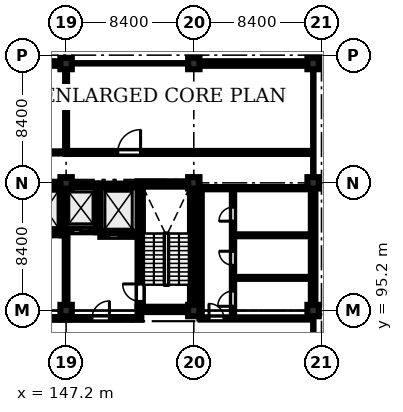
"""IFC4 building model, lengths in metres.
Left out: names, types, materials, properties, quantities, classifications, styles, units other than length and angle.
Written with IfcOpenShell. Run it as: python <this file> out.ifc"""

import sys

from ifc_helpers import new_model, si_unit, direction, frame, frame_2d, origin, origin_2d, place, context, subcontext, project, spatial, rectangle, extrude, element, fill, save


model = new_model("IFC4")
c1 = context("Model", 3, precision=1e-05, world=origin(), true_north=direction((0.0, 1.0)))
c2 = subcontext(c1, "Body", "Model", "MODEL_VIEW")
j1 = project(units=[si_unit("LENGTHUNIT", "METRE"), si_unit("PLANEANGLEUNIT", "RADIAN")], contexts=[c1])
p1 = place(None, origin())
s1 = spatial("IfcSite", under=j1, at=p1, CompositionType="ELEMENT")
p2 = place(p1, origin())
s2 = spatial("IfcBuilding", under=s1, at=p2, CompositionType="ELEMENT")
p3 = place(p2, frame((0.0, 0.0, 48.6)))
s3 = spatial("IfcBuildingStorey", under=s2, at=p3, CompositionType="ELEMENT", Elevation=48.6)
for number, where, z_axis, x_axis in (
    (1, (147.2, 95.2, 0.0), (0.0, 0.0, 1.0), (1.0, 0.0, 0.0)),
    (2, (147.2, 103.6, 0.0), (0.0, 0.0, 1.0), (1.0, 0.0, 0.0)),
    (3, (147.2, 111.45, 0.0), (0.0, 0.0, 1.0), (1.0, 0.0, 0.0)),
    (4, (155.6, 95.2, 0.0), (0.0, 0.0, 1.0), (1.0, 0.0, 0.0)),
    (5, (155.6, 103.6, 0.0), (0.0, 0.0, 1.0), (1.0, 0.0, 0.0)),
    (6, (155.6, 111.45, 0.0), (0.0, 0.0, 1.0), (1.0, 0.0, 0.0)),
    (7, (163.45, 95.2, 0.0), (0.0, 0.0, 1.0), (1.0, 0.0, 0.0)),
    (8, (163.45, 103.6, 0.0), (0.0, 0.0, 1.0), (1.0, 0.0, 0.0)),
    (9, (163.45, 111.45, 0.0), (0.0, 0.0, 1.0), (1.0, 0.0, 0.0)),
):
    element("IfcColumn", number, at=place(p3, frame(where, z_axis=z_axis, x_axis=x_axis)), inside=s3, PredefinedType="COLUMN", context=c2, shape_type="SweptSolid", body=[
        extrude(rectangle(XDim=0.75, YDim=0.75, at=origin_2d()), origin(), (0.0, 0.0, 1.0), 4.03),
    ])
for number, where, z_axis, x_axis in (
    (10, (151.9, 95.275, 0.0), (0.0, 0.0, 1.0), (1.0, 0.0, 0.0)),
    (11, (151.9, 103.525, 0.0), (0.0, 0.0, 1.0), (1.0, 0.0, 0.0)),
):
    element("IfcWall", number, at=place(p3, frame(where, z_axis=z_axis, x_axis=x_axis)), inside=s3, PredefinedType="SHEAR", context=c2, shape_type="SweptSolid", body=[
        extrude(rectangle(XDim=3.8, YDim=0.35, at=frame_2d((1.9, 0.0))), origin(), (0.0, 0.0, 1.0), 4.03),
    ])
p4 = place(p3, frame((152.075, 95.45, 0.0), z_axis=(0.0, 0.0, 1.0), x_axis=(0.0, 1.0, 0.0)))
e12 = element("IfcWall", 12, at=p4, inside=s3, PredefinedType="SHEAR", context=c2, shape_type="SweptSolid", body=[
    extrude(rectangle(XDim=7.9, YDim=0.35, at=frame_2d((3.95, 0.0))), origin(), (0.0, 0.0, 1.0), 4.03),
])
p5 = place(p4, frame((0.35, 0.0, 0.0)))
e13 = element("IfcOpeningElement", 13, at=p5, cuts=e12, PredefinedType="OPENING", context=c2, shape_type="SweptSolid", body=[
    extrude(rectangle(XDim=1.15, YDim=2.15, at=frame_2d((0.575, 1.075))), frame((0.0, 0.185, 0.0), z_axis=(0.0, -1.0, 0.0), x_axis=(1.0, 0.0, 0.0)), (0.0, 0.0, 1.0), 0.37),
])
p6 = place(p3, frame((155.525, 95.45, 0.0), z_axis=(0.0, 0.0, 1.0), x_axis=(0.0, 1.0, 0.0)))
e14 = element("IfcWall", 14, at=p6, inside=s3, PredefinedType="SHEAR", context=c2, shape_type="SweptSolid", body=[
    extrude(rectangle(XDim=7.9, YDim=0.35, at=frame_2d((3.95, 0.0))), origin(), (0.0, 0.0, 1.0), 4.03),
])
p7 = place(p3, frame((144.85, 100.275, 0.0), z_axis=(0.0, 0.0, 1.0), x_axis=(1.0, 0.0, 0.0)))
e15 = element("IfcWall", 15, at=p7, inside=s3, PredefinedType="SHEAR", context=c2, shape_type="SweptSolid", body=[
    extrude(rectangle(XDim=2.05, YDim=0.25, at=frame_2d((1.025, 0.0))), origin(), (0.0, 0.0, 1.0), 4.03),
])
p8 = place(p7, frame((0.465, 0.0, 0.0)))
e16 = element("IfcOpeningElement", 16, at=p8, cuts=e15, PredefinedType="OPENING", context=c2, shape_type="SweptSolid", body=[
    extrude(rectangle(XDim=1.12, YDim=2.15, at=frame_2d((0.56, 1.075))), frame((0.0, 0.135, 0.0), z_axis=(0.0, -1.0, 0.0), x_axis=(1.0, 0.0, 0.0)), (0.0, 0.0, 1.0), 0.27),
])
p9 = place(p3, frame((144.85, 103.425, 0.0), z_axis=(0.0, 0.0, 1.0), x_axis=(1.0, 0.0, 0.0)))
e17 = element("IfcWall", 17, at=p9, inside=s3, PredefinedType="SHEAR", context=c2, shape_type="SweptSolid", body=[
    extrude(rectangle(XDim=2.05, YDim=0.25, at=frame_2d((1.025, 0.0))), origin(), (0.0, 0.0, 1.0), 4.03),
])
p10 = place(p3, frame((147.025, 100.15, 0.0), z_axis=(0.0, 0.0, 1.0), x_axis=(0.0, 1.0, 0.0)))
e18 = element("IfcWall", 18, at=p10, inside=s3, PredefinedType="SHEAR", context=c2, shape_type="SweptSolid", body=[
    extrude(rectangle(XDim=3.4, YDim=0.25, at=frame_2d((1.7, 0.0))), origin(), (0.0, 0.0, 1.0), 4.03),
])
p11 = place(p3, frame((147.15, 100.475, 0.0), z_axis=(0.0, 0.0, 1.0), x_axis=(1.0, 0.0, 0.0)))
e19 = element("IfcWall", 19, at=p11, inside=s3, PredefinedType="SHEAR", context=c2, shape_type="SweptSolid", body=[
    extrude(rectangle(XDim=2.05, YDim=0.25, at=frame_2d((1.025, 0.0))), origin(), (0.0, 0.0, 1.0), 4.03),
])
p12 = place(p11, frame((0.495, 0.0, 0.0)))
e20 = element("IfcOpeningElement", 20, at=p12, cuts=e19, PredefinedType="OPENING", context=c2, shape_type="SweptSolid", body=[
    extrude(rectangle(XDim=1.06, YDim=2.15, at=frame_2d((0.53, 1.075))), frame((0.0, 0.135, 0.0), z_axis=(0.0, -1.0, 0.0), x_axis=(1.0, 0.0, 0.0)), (0.0, 0.0, 1.0), 0.27),
])
p13 = place(p3, frame((147.15, 103.425, 0.0), z_axis=(0.0, 0.0, 1.0), x_axis=(1.0, 0.0, 0.0)))
e21 = element("IfcWall", 21, at=p13, inside=s3, PredefinedType="SHEAR", context=c2, shape_type="SweptSolid", body=[
    extrude(rectangle(XDim=2.05, YDim=0.25, at=frame_2d((1.025, 0.0))), origin(), (0.0, 0.0, 1.0), 4.03),
])
p14 = place(p3, frame((149.325, 100.35, 0.0), z_axis=(0.0, 0.0, 1.0), x_axis=(0.0, 1.0, 0.0)))
e22 = element("IfcWall", 22, at=p14, inside=s3, PredefinedType="SHEAR", context=c2, shape_type="SweptSolid", body=[
    extrude(rectangle(XDim=3.2, YDim=0.25, at=frame_2d((1.6, 0.0))), origin(), (0.0, 0.0, 1.0), 4.03),
])
p15 = place(p3, frame((149.45, 100.175, 0.0), z_axis=(0.0, 0.0, 1.0), x_axis=(1.0, 0.0, 0.0)))
e23 = element("IfcWall", 23, at=p15, inside=s3, PredefinedType="SHEAR", context=c2, shape_type="SweptSolid", body=[
    extrude(rectangle(XDim=2.45, YDim=0.25, at=frame_2d((1.225, 0.0))), origin(), (0.0, 0.0, 1.0), 4.03),
])
p16 = place(p15, frame((0.575, 0.0, 0.0)))
e24 = element("IfcOpeningElement", 24, at=p16, cuts=e23, PredefinedType="OPENING", context=c2, shape_type="SweptSolid", body=[
    extrude(rectangle(XDim=1.3, YDim=2.25, at=frame_2d((0.65, 1.125))), frame((0.0, 0.135, 0.0), z_axis=(0.0, -1.0, 0.0), x_axis=(1.0, 0.0, 0.0)), (0.0, 0.0, 1.0), 0.27),
])
p17 = place(p3, frame((149.45, 103.425, 0.0), z_axis=(0.0, 0.0, 1.0), x_axis=(1.0, 0.0, 0.0)))
e25 = element("IfcWall", 25, at=p17, inside=s3, PredefinedType="SHEAR", context=c2, shape_type="SweptSolid", body=[
    extrude(rectangle(XDim=2.45, YDim=0.25, at=frame_2d((1.225, 0.0))), origin(), (0.0, 0.0, 1.0), 4.03),
])
p18 = place(p3, frame((139.175, 111.45, 0.0), z_axis=(0.0, 0.0, 1.0), x_axis=(1.0, 0.0, 0.0)))
e26 = element("IfcWall", 26, at=p18, inside=s3, PredefinedType="STANDARD", context=c2, shape_type="SweptSolid", body=[
    extrude(rectangle(XDim=7.65, YDim=0.3, at=frame_2d((3.825, 0.0))), origin(), (0.0, 0.0, 1.0), 3.33),
])
p19 = place(p18, frame((0.85, 0.0, 0.9)))
e27 = element("IfcOpeningElement", 27, at=p19, cuts=e26, PredefinedType="OPENING", context=c2, shape_type="SweptSolid", body=[
    extrude(rectangle(XDim=1.6, YDim=2.0, at=frame_2d((0.8, 1.0))), frame((0.0, 0.16, 0.0), z_axis=(0.0, -1.0, 0.0), x_axis=(1.0, 0.0, 0.0)), (0.0, 0.0, 1.0), 0.32),
])
p20 = place(p18, frame((4.65, 0.0, 0.9)))
e28 = element("IfcOpeningElement", 28, at=p20, cuts=e26, PredefinedType="OPENING", context=c2, shape_type="SweptSolid", body=[
    extrude(rectangle(XDim=1.6, YDim=2.0, at=frame_2d((0.8, 1.0))), frame((0.0, 0.16, 0.0), z_axis=(0.0, -1.0, 0.0), x_axis=(1.0, 0.0, 0.0)), (0.0, 0.0, 1.0), 0.32),
])
p21 = place(p3, frame((155.975, 111.45, 0.0), z_axis=(0.0, 0.0, 1.0), x_axis=(1.0, 0.0, 0.0)))
e29 = element("IfcWall", 29, at=p21, inside=s3, PredefinedType="STANDARD", context=c2, shape_type="SweptSolid", body=[
    extrude(rectangle(XDim=7.1, YDim=0.3, at=frame_2d((3.55, 0.0))), origin(), (0.0, 0.0, 1.0), 3.33),
])
p22 = place(p21, frame((0.85, 0.0, 0.9)))
e30 = element("IfcOpeningElement", 30, at=p22, cuts=e29, PredefinedType="OPENING", context=c2, shape_type="SweptSolid", body=[
    extrude(rectangle(XDim=1.6, YDim=2.0, at=frame_2d((0.8, 1.0))), frame((0.0, 0.16, 0.0), z_axis=(0.0, -1.0, 0.0), x_axis=(1.0, 0.0, 0.0)), (0.0, 0.0, 1.0), 0.32),
])
p23 = place(p21, frame((4.65, 0.0, 0.9)))
e31 = element("IfcOpeningElement", 31, at=p23, cuts=e29, PredefinedType="OPENING", context=c2, shape_type="SweptSolid", body=[
    extrude(rectangle(XDim=1.6, YDim=2.0, at=frame_2d((0.8, 1.0))), frame((0.0, 0.16, 0.0), z_axis=(0.0, -1.0, 0.0), x_axis=(1.0, 0.0, 0.0)), (0.0, 0.0, 1.0), 0.32),
])
p24 = place(p3, frame((163.45, 103.225, 0.0), z_axis=(0.0, 0.0, 1.0), x_axis=(0.0, -1.0, 0.0)))
e32 = element("IfcWall", 32, at=p24, inside=s3, PredefinedType="STANDARD", context=c2, shape_type="SweptSolid", body=[
    extrude(rectangle(XDim=7.65, YDim=0.3, at=frame_2d((3.825, 0.0))), origin(), (0.0, 0.0, 1.0), 3.33),
])
p25 = place(p24, frame((1.15, 0.0, 1.1)))
e33 = element("IfcOpeningElement", 33, at=p25, cuts=e32, PredefinedType="OPENING", context=c2, shape_type="SweptSolid", body=[
    extrude(rectangle(XDim=1.4, YDim=1.4, at=frame_2d((0.7, 0.7))), frame((0.0, 0.16, 0.0), z_axis=(0.0, -1.0, 0.0), x_axis=(1.0, 0.0, 0.0)), (0.0, 0.0, 1.0), 0.32),
])
p26 = place(p3, frame((142.3, 94.68, 0.0), z_axis=(0.0, 0.0, 1.0), x_axis=(1.0, 0.0, 0.0)))
e34 = element("IfcWall", 34, at=p26, inside=s3, PredefinedType="STANDARD", context=c2, shape_type="SweptSolid", body=[
    extrude(rectangle(XDim=4.8, YDim=0.18, at=frame_2d((2.4, 0.0))), origin(), (0.0, 0.0, 1.0), 4.03),
])
p27 = place(p26, frame((1.6, 0.0, 0.0)))
e35 = element("IfcOpeningElement", 35, at=p27, cuts=e34, PredefinedType="OPENING", context=c2, shape_type="SweptSolid", body=[
    extrude(rectangle(XDim=1.15, YDim=2.15, at=frame_2d((0.575, 1.075))), frame((0.0, 0.1, 0.0), z_axis=(0.0, -1.0, 0.0), x_axis=(1.0, 0.0, 0.0)), (0.0, 0.0, 1.0), 0.2),
])
p28 = place(p3, frame((147.3, 94.68, 0.0), z_axis=(0.0, 0.0, 1.0), x_axis=(1.0, 0.0, 0.0)))
e36 = element("IfcWall", 36, at=p28, inside=s3, PredefinedType="STANDARD", context=c2, shape_type="SweptSolid", body=[
    extrude(rectangle(XDim=4.85, YDim=0.18, at=frame_2d((2.425, 0.0))), origin(), (0.0, 0.0, 1.0), 4.03),
])
p29 = place(p28, frame((1.6, 0.0, 0.0)))
e37 = element("IfcOpeningElement", 37, at=p29, cuts=e36, PredefinedType="OPENING", context=c2, shape_type="SweptSolid", body=[
    extrude(rectangle(XDim=1.15, YDim=2.15, at=frame_2d((0.575, 1.075))), frame((0.0, 0.1, 0.0), z_axis=(0.0, -1.0, 0.0), x_axis=(1.0, 0.0, 0.0)), (0.0, 0.0, 1.0), 0.2),
])
p30 = place(p3, frame((147.2, 95.75, 0.0), z_axis=(0.0, 0.0, 1.0), x_axis=(0.0, 1.0, 0.0)))
e38 = element("IfcWall", 38, at=p30, inside=s3, PredefinedType="STANDARD", context=c2, shape_type="SweptSolid", body=[
    extrude(rectangle(XDim=4.5, YDim=0.18, at=frame_2d((2.25, 0.0))), origin(), (0.0, 0.0, 1.0), 3.33),
])
p31 = place(p3, frame((156.05, 94.68, 0.0), z_axis=(0.0, 0.0, 1.0), x_axis=(1.0, 0.0, 0.0)))
e39 = element("IfcWall", 39, at=p31, inside=s3, PredefinedType="PARTITIONING", context=c2, shape_type="SweptSolid", body=[
    extrude(rectangle(XDim=7.15, YDim=0.15, at=frame_2d((3.575, 0.0))), origin(), (0.0, 0.0, 1.0), 4.03),
])
p32 = place(p31, frame((0.55, 0.0, 0.0)))
e40 = element("IfcOpeningElement", 40, at=p32, cuts=e39, PredefinedType="OPENING", context=c2, shape_type="SweptSolid", body=[
    extrude(rectangle(XDim=0.98, YDim=2.12, at=frame_2d((0.49, 1.06))), frame((0.0, 0.085, 0.0), z_axis=(0.0, -1.0, 0.0), x_axis=(1.0, 0.0, 0.0)), (0.0, 0.0, 1.0), 0.17),
])
p33 = place(p3, frame((158.18, 94.68, 0.0), z_axis=(0.0, 0.0, 1.0), x_axis=(0.0, 1.0, 0.0)))
e41 = element("IfcWall", 41, at=p33, inside=s3, PredefinedType="PARTITIONING", context=c2, shape_type="SweptSolid", body=[
    extrude(rectangle(XDim=8.57, YDim=0.15, at=frame_2d((4.285, 0.0))), origin(), (0.0, 0.0, 1.0), 4.03),
])
p34 = place(p33, frame((0.8, 0.0, 0.0)))
e42 = element("IfcOpeningElement", 42, at=p34, cuts=e41, PredefinedType="OPENING", context=c2, shape_type="SweptSolid", body=[
    extrude(rectangle(XDim=1.0, YDim=2.12, at=frame_2d((0.5, 1.06))), frame((0.0, 0.085, 0.0), z_axis=(0.0, -1.0, 0.0), x_axis=(1.0, 0.0, 0.0)), (0.0, 0.0, 1.0), 0.17),
])
p35 = place(p33, frame((3.5, 0.0, 0.0)))
e43 = element("IfcOpeningElement", 43, at=p35, cuts=e41, PredefinedType="OPENING", context=c2, shape_type="SweptSolid", body=[
    extrude(rectangle(XDim=0.92, YDim=2.1, at=frame_2d((0.46, 1.05))), frame((0.0, 0.085, 0.0), z_axis=(0.0, -1.0, 0.0), x_axis=(1.0, 0.0, 0.0)), (0.0, 0.0, 1.0), 0.17),
])
p36 = place(p33, frame((6.4, 0.0, 0.0)))
e44 = element("IfcOpeningElement", 44, at=p36, cuts=e41, PredefinedType="OPENING", context=c2, shape_type="SweptSolid", body=[
    extrude(rectangle(XDim=0.92, YDim=2.1, at=frame_2d((0.46, 1.05))), frame((0.0, 0.085, 0.0), z_axis=(0.0, -1.0, 0.0), x_axis=(1.0, 0.0, 0.0)), (0.0, 0.0, 1.0), 0.17),
])
for number, where, z_axis, x_axis in (
    (45, (158.18, 97.35, 0.0), (0.0, 0.0, 1.0), (1.0, 0.0, 0.0)),
    (46, (158.18, 100.15, 0.0), (0.0, 0.0, 1.0), (1.0, 0.0, 0.0)),
):
    element("IfcWall", number, at=place(p3, frame(where, z_axis=z_axis, x_axis=x_axis)), inside=s3, PredefinedType="PARTITIONING", context=c2, shape_type="SweptSolid", body=[
        extrude(rectangle(XDim=5.02, YDim=0.128, at=frame_2d((2.51, 0.0))), origin(), (0.0, 0.0, 1.0), 4.03),
    ])
p37 = place(p3, frame((156.05, 103.25, 0.0), z_axis=(0.0, 0.0, 1.0), x_axis=(1.0, 0.0, 0.0)))
e47 = element("IfcWall", 47, at=p37, inside=s3, PredefinedType="PARTITIONING", context=c2, shape_type="SweptSolid", body=[
    extrude(rectangle(XDim=7.15, YDim=0.15, at=frame_2d((3.575, 0.0))), origin(), (0.0, 0.0, 1.0), 4.03),
])
p38 = place(p3, frame((156.05, 94.68, 0.0), z_axis=(0.0, 0.0, 1.0), x_axis=(0.0, 1.0, 0.0)))
e48 = element("IfcWall", 48, at=p38, inside=s3, PredefinedType="PARTITIONING", context=c2, shape_type="SweptSolid", body=[
    extrude(rectangle(XDim=8.57, YDim=0.15, at=frame_2d((4.285, 0.0))), origin(), (0.0, 0.0, 1.0), 4.03),
])
p39 = place(p3, frame((122.15, 105.6, 0.0), z_axis=(0.0, 0.0, 1.0), x_axis=(1.0, 0.0, 0.0)))
e49 = element("IfcWall", 49, at=p39, inside=s3, PredefinedType="PARTITIONING", context=c2, shape_type="SweptSolid", body=[
    extrude(rectangle(XDim=25.05, YDim=0.145, at=frame_2d((12.525, 0.0))), origin(), (0.0, 0.0, 1.0), 4.03),
])
p40 = place(p39, frame((3.75, 0.0, 0.0)))
e50 = element("IfcOpeningElement", 50, at=p40, cuts=e49, PredefinedType="OPENING", context=c2, shape_type="SweptSolid", body=[
    extrude(rectangle(XDim=1.64, YDim=2.24, at=frame_2d((0.82, 1.12))), frame((0.0, 0.083, 0.0), z_axis=(0.0, -1.0, 0.0), x_axis=(1.0, 0.0, 0.0)), (0.0, 0.0, 1.0), 0.165),
])
p41 = place(p3, frame((147.2, 105.6, 0.0), z_axis=(0.0, 0.0, 1.0), x_axis=(1.0, 0.0, 0.0)))
e51 = element("IfcWall", 51, at=p41, inside=s3, PredefinedType="SOLIDWALL", context=c2, shape_type="SweptSolid", body=[
    extrude(rectangle(XDim=16.15, YDim=0.2, at=frame_2d((8.075, 0.0))), origin(), (0.0, 0.0, 1.0), 4.03),
])
p42 = place(p41, frame((3.4, 0.0, 0.0)))
e52 = element("IfcOpeningElement", 52, at=p42, cuts=e51, PredefinedType="OPENING", context=c2, shape_type="SweptSolid", body=[
    extrude(rectangle(XDim=1.5, YDim=2.2, at=frame_2d((0.75, 1.1))), frame((0.0, 0.11, 0.0), z_axis=(0.0, -1.0, 0.0), x_axis=(1.0, 0.0, 0.0)), (0.0, 0.0, 1.0), 0.22),
])
p43 = place(p3, frame((147.2, 105.6, 0.0), z_axis=(0.0, 0.0, 1.0), x_axis=(0.0, 1.0, 0.0)))
e53 = element("IfcWall", 53, at=p43, inside=s3, PredefinedType="PARTITIONING", context=c2, shape_type="SweptSolid", body=[
    extrude(rectangle(XDim=5.75, YDim=0.128, at=frame_2d((2.875, 0.0))), origin(), (0.0, 0.0, 1.0), 3.33),
])
p44 = place(p22, origin())
e54 = element("IfcWindow", 54, at=p44, inside=s3, PartitioningType="DOUBLE_PANEL_VERTICAL", PredefinedType="WINDOW", context=c2, shape_type="SweptSolid", body=[
    extrude(rectangle(XDim=1.6, YDim=2.0, at=frame_2d((0.8, 1.0))), frame((0.0, 0.03, 0.0), z_axis=(0.0, -1.0, 0.0), x_axis=(1.0, 0.0, 0.0)), (0.0, 0.0, 1.0), 0.06),
])
fill(e30, e54)
p45 = place(p23, origin())
e55 = element("IfcWindow", 55, at=p45, inside=s3, PartitioningType="DOUBLE_PANEL_VERTICAL", PredefinedType="WINDOW", context=c2, shape_type="SweptSolid", body=[
    extrude(rectangle(XDim=1.6, YDim=2.0, at=frame_2d((0.8, 1.0))), frame((0.0, 0.03, 0.0), z_axis=(0.0, -1.0, 0.0), x_axis=(1.0, 0.0, 0.0)), (0.0, 0.0, 1.0), 0.06),
])
fill(e31, e55)
p46 = place(p25, origin())
e56 = element("IfcWindow", 56, at=p46, inside=s3, PartitioningType="SINGLE_PANEL", PredefinedType="WINDOW", context=c2, shape_type="SweptSolid", body=[
    extrude(rectangle(XDim=1.4, YDim=1.4, at=frame_2d((0.7, 0.7))), frame((0.0, 0.03, 0.0), z_axis=(0.0, -1.0, 0.0), x_axis=(1.0, 0.0, 0.0)), (0.0, 0.0, 1.0), 0.06),
])
fill(e33, e56)
p47 = place(p29, origin())
e57 = element("IfcDoor", 57, at=p47, inside=s3, OperationType="SINGLE_SWING_RIGHT", PredefinedType="DOOR", context=c2, shape_type="SweptSolid", body=[
    extrude(rectangle(XDim=1.15, YDim=2.15, at=frame_2d((0.575, 1.075))), frame((0.0, 0.025, 0.0), z_axis=(0.0, -1.0, 0.0), x_axis=(1.0, 0.0, 0.0)), (0.0, 0.0, 1.0), 0.05),
])
fill(e37, e57)
p48 = place(p32, origin())
e58 = element("IfcDoor", 58, at=p48, inside=s3, OperationType="SINGLE_SWING_LEFT", PredefinedType="DOOR", context=c2, shape_type="SweptSolid", body=[
    extrude(rectangle(XDim=0.98, YDim=2.12, at=frame_2d((0.49, 1.06))), frame((0.0, 0.025, 0.0), z_axis=(0.0, -1.0, 0.0), x_axis=(1.0, 0.0, 0.0)), (0.0, 0.0, 1.0), 0.05),
])
fill(e40, e58)
p49 = place(p34, origin())
e59 = element("IfcDoor", 59, at=p49, inside=s3, OperationType="SINGLE_SWING_LEFT", PredefinedType="DOOR", context=c2, shape_type="SweptSolid", body=[
    extrude(rectangle(XDim=1.0, YDim=2.12, at=frame_2d((0.5, 1.06))), frame((0.0, 0.025, 0.0), z_axis=(0.0, -1.0, 0.0), x_axis=(1.0, 0.0, 0.0)), (0.0, 0.0, 1.0), 0.05),
])
fill(e42, e59)
p50 = place(p35, origin())
e60 = element("IfcDoor", 60, at=p50, inside=s3, OperationType="SINGLE_SWING_RIGHT", PredefinedType="DOOR", context=c2, shape_type="SweptSolid", body=[
    extrude(rectangle(XDim=0.92, YDim=2.1, at=frame_2d((0.46, 1.05))), frame((0.0, 0.025, 0.0), z_axis=(0.0, -1.0, 0.0), x_axis=(1.0, 0.0, 0.0)), (0.0, 0.0, 1.0), 0.05),
])
fill(e43, e60)
p51 = place(p36, origin())
e61 = element("IfcDoor", 61, at=p51, inside=s3, OperationType="SINGLE_SWING_LEFT", PredefinedType="DOOR", context=c2, shape_type="SweptSolid", body=[
    extrude(rectangle(XDim=0.92, YDim=2.1, at=frame_2d((0.46, 1.05))), frame((0.0, 0.025, 0.0), z_axis=(0.0, -1.0, 0.0), x_axis=(1.0, 0.0, 0.0)), (0.0, 0.0, 1.0), 0.05),
])
fill(e44, e61)
p52 = place(p42, origin())
e62 = element("IfcDoor", 62, at=p52, inside=s3, OperationType="SINGLE_SWING_RIGHT", PredefinedType="DOOR", context=c2, shape_type="SweptSolid", body=[
    extrude(rectangle(XDim=1.5, YDim=2.2, at=frame_2d((0.75, 1.1))), frame((0.0, 0.025, 0.0), z_axis=(0.0, -1.0, 0.0), x_axis=(1.0, 0.0, 0.0)), (0.0, 0.0, 1.0), 0.05),
])
fill(e52, e62)
p53 = place(p5, origin())
e63 = element("IfcDoor", 63, at=p53, inside=s3, OperationType="SINGLE_SWING_RIGHT", PredefinedType="DOOR", context=c2, shape_type="SweptSolid", body=[
    extrude(rectangle(XDim=1.15, YDim=2.15, at=frame_2d((0.575, 1.075))), frame((0.0, 0.025, 0.0), z_axis=(0.0, -1.0, 0.0), x_axis=(1.0, 0.0, 0.0)), (0.0, 0.0, 1.0), 0.05),
])
fill(e13, e63)
p54 = place(p8, origin())
e64 = element("IfcDoor", 64, at=p54, inside=s3, OperationType="SLIDING_TO_LEFT", PredefinedType="DOOR", context=c2, shape_type="SweptSolid", body=[
    extrude(rectangle(XDim=1.12, YDim=2.15, at=frame_2d((0.56, 1.075))), frame((0.0, 0.025, 0.0), z_axis=(0.0, -1.0, 0.0), x_axis=(1.0, 0.0, 0.0)), (0.0, 0.0, 1.0), 0.05),
])
fill(e16, e64)
p55 = place(p12, origin())
e65 = element("IfcDoor", 65, at=p55, inside=s3, OperationType="SLIDING_TO_LEFT", PredefinedType="DOOR", context=c2, shape_type="SweptSolid", body=[
    extrude(rectangle(XDim=1.06, YDim=2.15, at=frame_2d((0.53, 1.075))), frame((0.0, 0.025, 0.0), z_axis=(0.0, -1.0, 0.0), x_axis=(1.0, 0.0, 0.0)), (0.0, 0.0, 1.0), 0.05),
])
fill(e20, e65)
p56 = place(p16, origin())
e66 = element("IfcDoor", 66, at=p56, inside=s3, OperationType="SLIDING_TO_LEFT", PredefinedType="DOOR", context=c2, shape_type="SweptSolid", body=[
    extrude(rectangle(XDim=1.3, YDim=2.25, at=frame_2d((0.65, 1.125))), frame((0.0, 0.025, 0.0), z_axis=(0.0, -1.0, 0.0), x_axis=(1.0, 0.0, 0.0)), (0.0, 0.0, 1.0), 0.05),
])
fill(e24, e66)
save(model, sys.argv[1])
